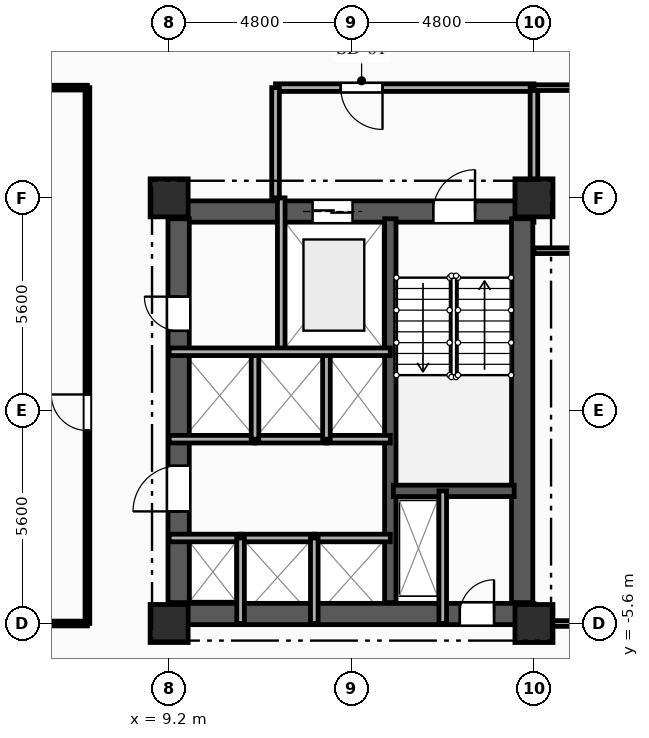
"""IFC4 building model, lengths in metres.
Left out: names, types, materials, properties, quantities, classifications, styles, units other than length and angle.
Written with IfcOpenShell. Run it as: python <this file> out.ifc"""

import sys

from ifc_helpers import new_model, si_unit, direction, frame, frame_2d, origin, origin_2d, place, context, subcontext, project, spatial, rectangle, extrude, element, fill, save


model = new_model("IFC4")
c1 = context("Model", 3, precision=1e-05, world=origin(), true_north=direction((0.0, 1.0)))
c2 = subcontext(c1, "Body", "Model", "MODEL_VIEW")
j1 = project(units=[si_unit("LENGTHUNIT", "METRE"), si_unit("PLANEANGLEUNIT", "RADIAN")], contexts=[c1])
p1 = place(None, origin())
s1 = spatial("IfcSite", under=j1, at=p1, CompositionType="ELEMENT")
p2 = place(p1, origin())
s2 = spatial("IfcBuilding", under=s1, at=p2, CompositionType="ELEMENT")
p3 = place(p2, frame((0.0, 0.0, 105.8)))
s3 = spatial("IfcBuildingStorey", under=s2, at=p3, CompositionType="ELEMENT", Elevation=105.8)
for number, where, z_axis, x_axis in (
    (1, (9.2, -5.6, 0.0), (0.0, 0.0, 1.0), (1.0, 0.0, 0.0)),
    (2, (9.2, 5.6, 0.0), (0.0, 0.0, 1.0), (1.0, 0.0, 0.0)),
    (3, (18.8, -5.6, 0.0), (0.0, 0.0, 1.0), (1.0, 0.0, 0.0)),
    (4, (18.8, 5.6, 0.0), (0.0, 0.0, 1.0), (1.0, 0.0, 0.0)),
):
    element("IfcColumn", number, at=place(p3, frame(where, z_axis=z_axis, x_axis=x_axis)), inside=s3, PredefinedType="COLUMN", context=c2, shape_type="SweptSolid", body=[
        extrude(rectangle(XDim=1.0, YDim=1.0, at=origin_2d()), origin(), (0.0, 0.0, 1.0), 3.35),
    ])
p4 = place(p3, frame((9.2, 5.24, 0.0), z_axis=(0.0, 0.0, 1.0), x_axis=(1.0, 0.0, 0.0)))
e5 = element("IfcWall", 5, at=p4, inside=s3, PredefinedType="SHEAR", context=c2, shape_type="SweptSolid", body=[
    extrude(rectangle(XDim=9.6, YDim=0.56, at=frame_2d((4.8, 0.0))), origin(), (0.0, 0.0, 1.0), 3.045),
])
p5 = place(p4, frame((6.95, 0.0, 0.0)))
e6 = element("IfcOpeningElement", 6, at=p5, cuts=e5, PredefinedType="OPENING", context=c2, shape_type="SweptSolid", body=[
    extrude(rectangle(XDim=1.1, YDim=2.15, at=frame_2d((0.55, 1.075))), frame((0.0, 0.29, 0.0), z_axis=(0.0, -1.0, 0.0), x_axis=(1.0, 0.0, 0.0)), (0.0, 0.0, 1.0), 0.58),
])
p6 = place(p4, frame((3.775, 0.0, 0.0)))
e7 = element("IfcOpeningElement", 7, at=p6, cuts=e5, PredefinedType="OPENING", context=c2, shape_type="SweptSolid", body=[
    extrude(rectangle(XDim=1.05, YDim=2.1, at=frame_2d((0.525, 1.05))), frame((0.0, 0.29, 0.0), z_axis=(0.0, -1.0, 0.0), x_axis=(1.0, 0.0, 0.0)), (0.0, 0.0, 1.0), 0.58),
])
p7 = place(p3, frame((9.2, -5.35, 0.0), z_axis=(0.0, 0.0, 1.0), x_axis=(1.0, 0.0, 0.0)))
e8 = element("IfcWall", 8, at=p7, inside=s3, PredefinedType="SHEAR", context=c2, shape_type="SweptSolid", body=[
    extrude(rectangle(XDim=9.6, YDim=0.56, at=frame_2d((4.8, 0.0))), origin(), (0.0, 0.0, 1.0), 3.045),
])
p8 = place(p7, frame((7.65, 0.0, 0.0)))
e9 = element("IfcOpeningElement", 9, at=p8, cuts=e8, PredefinedType="OPENING", context=c2, shape_type="SweptSolid", body=[
    extrude(rectangle(XDim=0.9, YDim=2.1, at=frame_2d((0.45, 1.05))), frame((0.0, 0.29, 0.0), z_axis=(0.0, -1.0, 0.0), x_axis=(1.0, 0.0, 0.0)), (0.0, 0.0, 1.0), 0.58),
])
p9 = place(p3, frame((9.45, -5.05, 0.0), z_axis=(0.0, 0.0, 1.0), x_axis=(0.0, 1.0, 0.0)))
e10 = element("IfcWall", 10, at=p9, inside=s3, PredefinedType="SHEAR", context=c2, shape_type="SweptSolid", body=[
    extrude(rectangle(XDim=10.1, YDim=0.56, at=frame_2d((5.05, 0.0))), origin(), (0.0, 0.0, 1.0), 3.045),
])
p10 = place(p9, frame((7.15, 0.0, 0.0)))
e11 = element("IfcOpeningElement", 11, at=p10, cuts=e10, PredefinedType="OPENING", context=c2, shape_type="SweptSolid", body=[
    extrude(rectangle(XDim=0.9, YDim=2.1, at=frame_2d((0.45, 1.05))), frame((0.0, 0.29, 0.0), z_axis=(0.0, -1.0, 0.0), x_axis=(1.0, 0.0, 0.0)), (0.0, 0.0, 1.0), 0.58),
])
p11 = place(p9, frame((2.4, 0.0, 0.0)))
e12 = element("IfcOpeningElement", 12, at=p11, cuts=e10, PredefinedType="OPENING", context=c2, shape_type="SweptSolid", body=[
    extrude(rectangle(XDim=1.2, YDim=2.15, at=frame_2d((0.6, 1.075))), frame((0.0, 0.29, 0.0), z_axis=(0.0, -1.0, 0.0), x_axis=(1.0, 0.0, 0.0)), (0.0, 0.0, 1.0), 0.58),
])
p12 = place(p3, frame((18.49, -5.05, 0.0), z_axis=(0.0, 0.0, 1.0), x_axis=(0.0, 1.0, 0.0)))
e13 = element("IfcWall", 13, at=p12, inside=s3, PredefinedType="SHEAR", context=c2, shape_type="SweptSolid", body=[
    extrude(rectangle(XDim=10.1, YDim=0.56, at=frame_2d((5.05, 0.0))), origin(), (0.0, 0.0, 1.0), 3.045),
])
p13 = place(p3, frame((15.02, -5.05, 0.0), z_axis=(0.0, 0.0, 1.0), x_axis=(0.0, 1.0, 0.0)))
e14 = element("IfcWall", 14, at=p13, inside=s3, PredefinedType="SHEAR", context=c2, shape_type="SweptSolid", body=[
    extrude(rectangle(XDim=10.1, YDim=0.3, at=frame_2d((5.05, 0.0))), origin(), (0.0, 0.0, 1.0), 3.045),
])
p14 = place(p3, frame((15.1, -2.11, 0.0), z_axis=(0.0, 0.0, 1.0), x_axis=(1.0, 0.0, 0.0)))
e15 = element("IfcWall", 15, at=p14, inside=s3, PredefinedType="SHEAR", context=c2, shape_type="SweptSolid", body=[
    extrude(rectangle(XDim=3.18, YDim=0.3, at=frame_2d((1.59, 0.0))), origin(), (0.0, 0.0, 1.0), 3.045),
])
p15 = place(p3, frame((16.4, -2.11, 0.0), z_axis=(0.0, 0.0, 1.0), x_axis=(0.0, -1.0, 0.0)))
e16 = element("IfcWall", 16, at=p15, inside=s3, PredefinedType="PARTITIONING", context=c2, shape_type="SweptSolid", body=[
    extrude(rectangle(XDim=3.49, YDim=0.2, at=frame_2d((1.745, 0.0))), origin(), (0.0, 0.0, 1.0), 3.045),
])
p16 = place(p3, frame((12.15, 5.6, 0.0), z_axis=(0.0, 0.0, 1.0), x_axis=(0.0, -1.0, 0.0)))
e17 = element("IfcWall", 17, at=p16, inside=s3, PredefinedType="PARTITIONING", context=c2, shape_type="SweptSolid", body=[
    extrude(rectangle(XDim=4.05, YDim=0.2, at=frame_2d((2.025, 0.0))), origin(), (0.0, 0.0, 1.0), 3.045),
])
p17 = place(p3, frame((18.8, 8.5, 0.0), z_axis=(0.0, 0.0, 1.0), x_axis=(-1.0, 0.0, 0.0)))
e18 = element("IfcWall", 18, at=p17, inside=s3, PredefinedType="PARTITIONING", context=c2, shape_type="SweptSolid", body=[
    extrude(rectangle(XDim=6.8, YDim=0.2, at=frame_2d((3.4, 0.0))), origin(), (0.0, 0.0, 1.0), 3.045),
])
p18 = place(p17, frame((3.985, 0.0, 0.0)))
e19 = element("IfcOpeningElement", 19, at=p18, cuts=e18, PredefinedType="OPENING", context=c2, shape_type="SweptSolid", body=[
    extrude(rectangle(XDim=1.1, YDim=2.15, at=frame_2d((0.55, 1.075))), frame((0.0, 0.11, 0.0), z_axis=(0.0, -1.0, 0.0), x_axis=(1.0, 0.0, 0.0)), (0.0, 0.0, 1.0), 0.22),
])
p19 = place(p3, frame((12.0, 8.5, 0.0), z_axis=(0.0, 0.0, 1.0), x_axis=(0.0, -1.0, 0.0)))
e20 = element("IfcWall", 20, at=p19, inside=s3, PredefinedType="PARTITIONING", context=c2, shape_type="SweptSolid", body=[
    extrude(rectangle(XDim=2.9, YDim=0.2, at=frame_2d((1.45, 0.0))), origin(), (0.0, 0.0, 1.0), 3.045),
])
p20 = place(p3, frame((18.8, 5.6, 0.0), z_axis=(0.0, 0.0, 1.0), x_axis=(0.0, 1.0, 0.0)))
e21 = element("IfcWall", 21, at=p20, inside=s3, PredefinedType="PARTITIONING", context=c2, shape_type="SweptSolid", body=[
    extrude(rectangle(XDim=2.9, YDim=0.2, at=frame_2d((1.45, 0.0))), origin(), (0.0, 0.0, 1.0), 2.53),
])
p21 = place(p3, frame((9.2, -3.35, 0.0), z_axis=(0.0, 0.0, 1.0), x_axis=(1.0, 0.0, 0.0)))
e22 = element("IfcWall", 22, at=p21, inside=s3, PredefinedType="PARTITIONING", context=c2, shape_type="SweptSolid", body=[
    extrude(rectangle(XDim=1.88, YDim=0.2, at=frame_2d((0.94, 0.0))), origin(), (0.0, 0.0, 1.0), 2.76),
])
p22 = place(p3, frame((11.08, -3.35, 0.0), z_axis=(0.0, 0.0, 1.0), x_axis=(1.0, 0.0, 0.0)))
e23 = element("IfcWall", 23, at=p22, inside=s3, PredefinedType="PARTITIONING", context=c2, shape_type="SweptSolid", body=[
    extrude(rectangle(XDim=1.94, YDim=0.2, at=frame_2d((0.97, 0.0))), origin(), (0.0, 0.0, 1.0), 3.045),
])
p23 = place(p3, frame((13.02, -3.35, 0.0), z_axis=(0.0, 0.0, 1.0), x_axis=(1.0, 0.0, 0.0)))
e24 = element("IfcWall", 24, at=p23, inside=s3, PredefinedType="PARTITIONING", context=c2, shape_type="SweptSolid", body=[
    extrude(rectangle(XDim=2.0, YDim=0.2, at=frame_2d((1.0, 0.0))), origin(), (0.0, 0.0, 1.0), 3.045),
])
p24 = place(p3, frame((11.46, -0.75, 0.0), z_axis=(0.0, 0.0, 1.0), x_axis=(-1.0, 0.0, 0.0)))
e25 = element("IfcWall", 25, at=p24, inside=s3, PredefinedType="PARTITIONING", context=c2, shape_type="SweptSolid", body=[
    extrude(rectangle(XDim=2.26, YDim=0.2, at=frame_2d((1.13, 0.0))), origin(), (0.0, 0.0, 1.0), 3.045),
])
p25 = place(p3, frame((13.34, -0.75, 0.0), z_axis=(0.0, 0.0, 1.0), x_axis=(-1.0, 0.0, 0.0)))
e26 = element("IfcWall", 26, at=p25, inside=s3, PredefinedType="PARTITIONING", context=c2, shape_type="SweptSolid", body=[
    extrude(rectangle(XDim=1.88, YDim=0.2, at=frame_2d((0.94, 0.0))), origin(), (0.0, 0.0, 1.0), 3.045),
])
p26 = place(p3, frame((15.02, -0.75, 0.0), z_axis=(0.0, 0.0, 1.0), x_axis=(-1.0, 0.0, 0.0)))
e27 = element("IfcWall", 27, at=p26, inside=s3, PredefinedType="PARTITIONING", context=c2, shape_type="SweptSolid", body=[
    extrude(rectangle(XDim=1.68, YDim=0.2, at=frame_2d((0.84, 0.0))), origin(), (0.0, 0.0, 1.0), 3.045),
])
for number, where, z_axis, x_axis in (
    (28, (11.08, -5.6, 0.0), (0.0, 0.0, 1.0), (0.0, 1.0, 0.0)),
    (29, (13.02, -5.6, 0.0), (0.0, 0.0, 1.0), (0.0, 1.0, 0.0)),
):
    element("IfcWall", number, at=place(p3, frame(where, z_axis=z_axis, x_axis=x_axis)), inside=s3, PredefinedType="PARTITIONING", context=c2, shape_type="SweptSolid", body=[
        extrude(rectangle(XDim=2.25, YDim=0.2, at=frame_2d((1.125, 0.0))), origin(), (0.0, 0.0, 1.0), 3.045),
    ])
for number, where, z_axis, x_axis in (
    (30, (11.46, -0.75, 0.0), (0.0, 0.0, 1.0), (0.0, 1.0, 0.0)),
    (31, (13.34, -0.75, 0.0), (0.0, 0.0, 1.0), (0.0, 1.0, 0.0)),
):
    element("IfcWall", number, at=place(p3, frame(where, z_axis=z_axis, x_axis=x_axis)), inside=s3, PredefinedType="PARTITIONING", context=c2, shape_type="SweptSolid", body=[
        extrude(rectangle(XDim=2.3, YDim=0.2, at=frame_2d((1.15, 0.0))), origin(), (0.0, 0.0, 1.0), 3.045),
    ])
p27 = place(p3, frame((23.0, 8.5, 0.0), z_axis=(0.0, 0.0, 1.0), x_axis=(-1.0, 0.0, 0.0)))
e32 = element("IfcWall", 32, at=p27, inside=s3, PredefinedType="PARTITIONING", context=c2, shape_type="SweptSolid", body=[
    extrude(rectangle(XDim=4.2, YDim=0.15, at=frame_2d((2.1, 0.0))), origin(), (0.0, 0.0, 1.0), 3.045),
])
p28 = place(p27, frame((0.829, 0.0, 0.0)))
e33 = element("IfcOpeningElement", 33, at=p28, cuts=e32, PredefinedType="OPENING", context=c2, shape_type="SweptSolid", body=[
    extrude(rectangle(XDim=1.05, YDim=2.15, at=frame_2d((0.525, 1.075))), frame((0.0, 0.085, 0.0), z_axis=(0.0, -1.0, 0.0), x_axis=(1.0, 0.0, 0.0)), (0.0, 0.0, 1.0), 0.17),
])
p29 = place(p3, frame((7.05, 8.5, 0.0), z_axis=(0.0, 0.0, 1.0), x_axis=(-1.0, 0.0, 0.0)))
e34 = element("IfcWall", 34, at=p29, inside=s3, PredefinedType="PARTITIONING", context=c2, shape_type="SweptSolid", body=[
    extrude(rectangle(XDim=7.05, YDim=0.125, at=frame_2d((3.525, 0.0))), origin(), (0.0, 0.0, 1.0), 3.045),
])
p30 = place(p3, frame((18.8, -5.6, 0.0), z_axis=(0.0, 0.0, 1.0), x_axis=(1.0, 0.0, 0.0)))
e35 = element("IfcWall", 35, at=p30, inside=s3, PredefinedType="PARTITIONING", context=c2, shape_type="SweptSolid", body=[
    extrude(rectangle(XDim=4.2, YDim=0.15, at=frame_2d((2.1, 0.0))), origin(), (0.0, 0.0, 1.0), 2.53),
])
p31 = place(p30, frame((2.321, 0.0, 0.0)))
e36 = element("IfcOpeningElement", 36, at=p31, cuts=e35, PredefinedType="OPENING", context=c2, shape_type="SweptSolid", body=[
    extrude(rectangle(XDim=1.05, YDim=2.15, at=frame_2d((0.525, 1.075))), frame((0.0, 0.085, 0.0), z_axis=(0.0, -1.0, 0.0), x_axis=(1.0, 0.0, 0.0)), (0.0, 0.0, 1.0), 0.17),
])
p32 = place(p3, frame((0.0, -5.6, 0.0), z_axis=(0.0, 0.0, 1.0), x_axis=(1.0, 0.0, 0.0)))
e37 = element("IfcWall", 37, at=p32, inside=s3, PredefinedType="PARTITIONING", context=c2, shape_type="SweptSolid", body=[
    extrude(rectangle(XDim=7.05, YDim=0.125, at=frame_2d((3.525, 0.0))), origin(), (0.0, 0.0, 1.0), 2.53),
])
p33 = place(p3, frame((7.05, -5.6, 0.0), z_axis=(0.0, 0.0, 1.0), x_axis=(0.0, 1.0, 0.0)))
e38 = element("IfcWall", 38, at=p33, inside=s3, PredefinedType="PARTITIONING", context=c2, shape_type="SweptSolid", body=[
    extrude(rectangle(XDim=14.1, YDim=0.125, at=frame_2d((7.05, 0.0))), origin(), (0.0, 0.0, 1.0), 3.045),
])
p34 = place(p33, frame((5.076, 0.0, 0.0)))
e39 = element("IfcOpeningElement", 39, at=p34, cuts=e38, PredefinedType="OPENING", context=c2, shape_type="SweptSolid", body=[
    extrude(rectangle(XDim=0.95, YDim=2.1, at=frame_2d((0.475, 1.05))), frame((0.0, 0.073, 0.0), z_axis=(0.0, -1.0, 0.0), x_axis=(1.0, 0.0, 0.0)), (0.0, 0.0, 1.0), 0.145),
])
p35 = place(p3, frame((18.8, 4.208, 0.0), z_axis=(0.0, 0.0, 1.0), x_axis=(0.9999942944, 0.003378042094, 0.0)))
e40 = element("IfcWall", 40, at=p35, inside=s3, PredefinedType="PARTITIONING", context=c2, shape_type="SweptSolid", body=[
    extrude(rectangle(XDim=13.009, YDim=0.15, at=frame_2d((6.504, 0.0))), origin(), (0.0, 0.0, 1.0), 3.045),
])
p36 = place(p3, frame((9.2, 1.55, 0.0), z_axis=(0.0, 0.0, 1.0), x_axis=(1.0, 0.0, 0.0)))
e41 = element("IfcWall", 41, at=p36, inside=s3, PredefinedType="PARTITIONING", context=c2, shape_type="SweptSolid", body=[
    extrude(rectangle(XDim=5.82, YDim=0.2, at=frame_2d((2.91, 0.0))), origin(), (0.0, 0.0, 1.0), 3.045),
])
p37 = place(p5, origin())
e42 = element("IfcDoor", 42, at=p37, inside=s3, OperationType="SINGLE_SWING_RIGHT", PredefinedType="DOOR", context=c2, shape_type="SweptSolid", body=[
    extrude(rectangle(XDim=1.1, YDim=2.15, at=frame_2d((0.55, 1.075))), frame((0.0, 0.025, 0.0), z_axis=(0.0, -1.0, 0.0), x_axis=(1.0, 0.0, 0.0)), (0.0, 0.0, 1.0), 0.05),
])
fill(e6, e42)
p38 = place(p6, origin())
e43 = element("IfcDoor", 43, at=p38, inside=s3, OperationType="DOUBLE_DOOR_SLIDING", PredefinedType="DOOR", context=c2, shape_type="SweptSolid", body=[
    extrude(rectangle(XDim=1.05, YDim=2.1, at=frame_2d((0.525, 1.05))), frame((0.0, 0.025, 0.0), z_axis=(0.0, -1.0, 0.0), x_axis=(1.0, 0.0, 0.0)), (0.0, 0.0, 1.0), 0.05),
])
fill(e7, e43)
p39 = place(p8, origin())
e44 = element("IfcDoor", 44, at=p39, inside=s3, OperationType="SINGLE_SWING_RIGHT", PredefinedType="DOOR", context=c2, shape_type="SweptSolid", body=[
    extrude(rectangle(XDim=0.9, YDim=2.1, at=frame_2d((0.45, 1.05))), frame((0.0, 0.025, 0.0), z_axis=(0.0, -1.0, 0.0), x_axis=(1.0, 0.0, 0.0)), (0.0, 0.0, 1.0), 0.05),
])
fill(e9, e44)
p40 = place(p18, origin())
e45 = element("IfcDoor", 45, at=p40, inside=s3, OperationType="SINGLE_SWING_LEFT", PredefinedType="DOOR", context=c2, shape_type="SweptSolid", body=[
    extrude(rectangle(XDim=1.1, YDim=2.15, at=frame_2d((0.55, 1.075))), frame((0.0, 0.025, 0.0), z_axis=(0.0, -1.0, 0.0), x_axis=(1.0, 0.0, 0.0)), (0.0, 0.0, 1.0), 0.05),
])
fill(e19, e45)
p41 = place(p10, origin())
e46 = element("IfcDoor", 46, at=p41, inside=s3, OperationType="SINGLE_SWING_RIGHT", PredefinedType="DOOR", context=c2, shape_type="SweptSolid", body=[
    extrude(rectangle(XDim=0.9, YDim=2.1, at=frame_2d((0.45, 1.05))), frame((0.0, 0.025, 0.0), z_axis=(0.0, -1.0, 0.0), x_axis=(1.0, 0.0, 0.0)), (0.0, 0.0, 1.0), 0.05),
])
fill(e11, e46)
p42 = place(p11, origin())
e47 = element("IfcDoor", 47, at=p42, inside=s3, OperationType="SINGLE_SWING_LEFT", PredefinedType="DOOR", context=c2, shape_type="SweptSolid", body=[
    extrude(rectangle(XDim=1.2, YDim=2.15, at=frame_2d((0.6, 1.075))), frame((0.0, 0.025, 0.0), z_axis=(0.0, -1.0, 0.0), x_axis=(1.0, 0.0, 0.0)), (0.0, 0.0, 1.0), 0.05),
])
fill(e12, e47)
p43 = place(p34, origin())
e48 = element("IfcDoor", 48, at=p43, inside=s3, OperationType="SINGLE_SWING_RIGHT", PredefinedType="DOOR", context=c2, shape_type="SweptSolid", body=[
    extrude(rectangle(XDim=0.95, YDim=2.1, at=frame_2d((0.475, 1.05))), frame((0.0, 0.025, 0.0), z_axis=(0.0, -1.0, 0.0), x_axis=(1.0, 0.0, 0.0)), (0.0, 0.0, 1.0), 0.05),
])
fill(e39, e48)
save(model, sys.argv[1])
